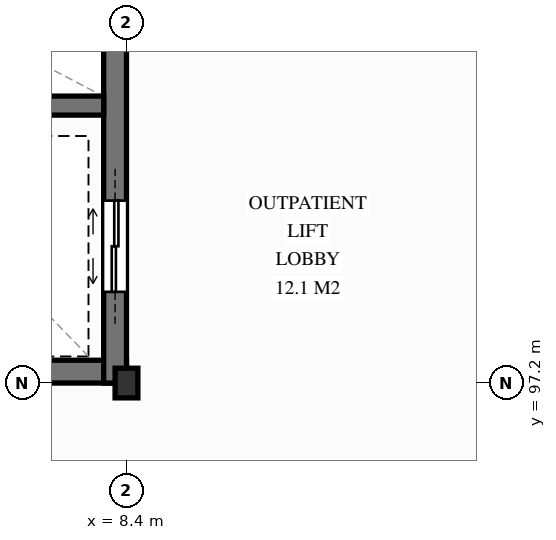
"""IFC4 building model, lengths in metres.
Left out: names, types, materials, properties, quantities, classifications, styles, units other than length and angle.
Written with IfcOpenShell. Run it as: python <this file> out.ifc"""

import sys

from ifc_helpers import new_model, si_unit, direction, frame, frame_2d, origin, origin_2d, place, context, subcontext, project, spatial, rectangle, i_section, extrude, element, fill, save


model = new_model("IFC4")
c1 = context("Model", 3, precision=1e-05, world=origin(), true_north=direction((0.0, 1.0)))
c2 = subcontext(c1, "Body", "Model", "MODEL_VIEW")
j1 = project(units=[si_unit("LENGTHUNIT", "METRE"), si_unit("PLANEANGLEUNIT", "RADIAN")], contexts=[c1])
p1 = place(None, origin())
s1 = spatial("IfcSite", under=j1, at=p1, CompositionType="ELEMENT")
p2 = place(p1, origin())
s2 = spatial("IfcBuilding", under=s1, at=p2, CompositionType="ELEMENT")
p3 = place(p2, frame((0.0, 0.0, 17.25)))
s3 = spatial("IfcBuildingStorey", under=s2, at=p3, CompositionType="ELEMENT", Elevation=17.25)
p4 = place(p3, frame((0.0, 97.35, 0.0), z_axis=(0.0, 0.0, 1.0), x_axis=(1.0, 0.0, 0.0)))
e1 = element("IfcWall", 1, at=p4, inside=s3, PredefinedType="SHEAR", context=c2, shape_type="SweptSolid", body=[
    extrude(rectangle(XDim=8.4, YDim=0.3, at=frame_2d((4.2, 0.0))), origin(), (0.0, 0.0, 1.0), 4.05),
])
p5 = place(p4, frame((3.0, 0.0, 0.0)))
e2 = element("IfcOpeningElement", 2, at=p5, cuts=e1, PredefinedType="OPENING", context=c2, shape_type="SweptSolid", body=[
    extrude(rectangle(XDim=1.1, YDim=2.15, at=frame_2d((0.55, 1.075))), frame((0.0, 0.16, 0.0), z_axis=(0.0, -1.0, 0.0), x_axis=(1.0, 0.0, 0.0)), (0.0, 0.0, 1.0), 0.32),
])
p6 = place(p3, frame((8.25, 97.2, 0.0), z_axis=(0.0, 0.0, 1.0), x_axis=(0.0, 1.0, 0.0)))
e3 = element("IfcWall", 3, at=p6, inside=s3, PredefinedType="SHEAR", context=c2, shape_type="SweptSolid", body=[
    extrude(rectangle(XDim=7.2, YDim=0.3, at=frame_2d((3.6, 0.0))), origin(), (0.0, 0.0, 1.0), 4.05),
])
p7 = place(p6, frame((1.2, 0.0, 0.0)))
e4 = element("IfcOpeningElement", 4, at=p7, cuts=e3, PredefinedType="OPENING", context=c2, shape_type="SweptSolid", body=[
    extrude(rectangle(XDim=1.2, YDim=2.15, at=frame_2d((0.6, 1.075))), frame((0.0, 0.16, 0.0), z_axis=(0.0, -1.0, 0.0), x_axis=(1.0, 0.0, 0.0)), (0.0, 0.0, 1.0), 0.32),
])
p8 = place(p3, frame((0.3, 100.85, 0.0), z_axis=(0.0, 0.0, 1.0), x_axis=(1.0, 0.0, 0.0)))
e5 = element("IfcWall", 5, at=p8, inside=s3, PredefinedType="SHEAR", context=c2, shape_type="SweptSolid", body=[
    extrude(rectangle(XDim=7.8, YDim=0.25, at=frame_2d((3.9, 0.0))), origin(), (0.0, 0.0, 1.0), 4.05),
])
p9 = place(p8, frame((0.4, 0.0, 0.0)))
e6 = element("IfcOpeningElement", 6, at=p9, cuts=e5, PredefinedType="OPENING", context=c2, shape_type="SweptSolid", body=[
    extrude(rectangle(XDim=1.1, YDim=2.15, at=frame_2d((0.55, 1.075))), frame((0.0, 0.135, 0.0), z_axis=(0.0, -1.0, 0.0), x_axis=(1.0, 0.0, 0.0)), (0.0, 0.0, 1.0), 0.27),
])
p10 = place(p3, frame((8.4, 97.2, 0.0), z_axis=(0.0, 0.0, 1.0), x_axis=(1.0, 0.0, 0.0)))
e7 = element("IfcColumn", 7, at=p10, inside=s3, PredefinedType="COLUMN", context=c2, shape_type="SweptSolid", body=[
    extrude(i_section(OverallWidth=0.3, OverallDepth=0.39, WebThickness=0.011, FlangeThickness=0.019, FilletRadius=0.027, at=origin_2d()), origin(), (0.0, 0.0, 1.0), 4.05),
])
p11 = place(p7, origin())
e8 = element("IfcDoor", 8, at=p11, inside=s3, OperationType="DOUBLE_DOOR_SLIDING", PredefinedType="DOOR", context=c2, shape_type="SweptSolid", body=[
    extrude(rectangle(XDim=1.2, YDim=2.15, at=frame_2d((0.6, 1.075))), frame((0.0, 0.025, 0.0), z_axis=(0.0, -1.0, 0.0), x_axis=(1.0, 0.0, 0.0)), (0.0, 0.0, 1.0), 0.05),
])
fill(e4, e8)
save(model, sys.argv[1])
